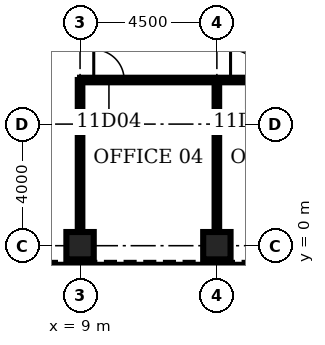
"""IFC4 building model, lengths in metres.
Left out: names, types, materials, properties, quantities, classifications, styles, units other than length and angle.
Written with IfcOpenShell. Run it as: python <this file> out.ifc"""

import sys

from ifc_helpers import new_model, si_unit, direction, frame, frame_2d, origin, origin_2d, place, context, subcontext, project, spatial, rectangle, hollow_rectangle, extrude, element, fill, save


model = new_model("IFC4")
c1 = context("Model", 3, precision=1e-05, world=origin(), true_north=direction((0.0, 1.0)))
c2 = subcontext(c1, "Body", "Model", "MODEL_VIEW")
j1 = project(units=[si_unit("LENGTHUNIT", "METRE"), si_unit("PLANEANGLEUNIT", "RADIAN")], contexts=[c1])
p1 = place(None, origin())
s1 = spatial("IfcSite", under=j1, at=p1, CompositionType="ELEMENT")
p2 = place(p1, origin())
s2 = spatial("IfcBuilding", under=s1, at=p2, CompositionType="ELEMENT")
p3 = place(p2, frame((0.0, 0.0, 54.5)))
s3 = spatial("IfcBuildingStorey", under=s2, at=p3, CompositionType="ELEMENT", Elevation=54.5)
for number, where, z_axis, x_axis in (
    (1, (9.0, 0.0, 0.0), (0.0, 0.0, 1.0), (0.0, 1.0, 0.0)),
    (2, (13.5, 0.0, 0.0), (0.0, 0.0, 1.0), (0.0, 1.0, 0.0)),
):
    element("IfcColumn", number, at=place(p3, frame(where, z_axis=z_axis, x_axis=x_axis)), inside=s3, PredefinedType="COLUMN", context=c2, shape_type="SweptSolid", body=[
        extrude(hollow_rectangle(XDim=0.9, YDim=0.9, WallThickness=0.12, at=origin_2d()), origin(), (0.0, 0.0, 1.0), 4.5),
    ])
p4 = place(p3, frame((9.0, 5.45, 0.0), z_axis=(0.0, 0.0, 1.0), x_axis=(1.0, 0.0, 0.0)))
e3 = element("IfcWall", 3, at=p4, inside=s3, PredefinedType="PARTITIONING", context=c2, shape_type="SweptSolid", body=[
    extrude(rectangle(XDim=13.5, YDim=0.15, at=frame_2d((6.75, 0.0))), origin(), (0.0, 0.0, 1.0), 3.0),
])
p5 = place(p4, frame((0.45, 0.0, 0.0)))
e4 = element("IfcOpeningElement", 4, at=p5, cuts=e3, PredefinedType="OPENING", context=c2, shape_type="SweptSolid", body=[
    extrude(rectangle(XDim=1.0, YDim=2.1, at=frame_2d((0.5, 1.05))), frame((0.0, 0.085, 0.0), z_axis=(0.0, -1.0, 0.0), x_axis=(1.0, 0.0, 0.0)), (0.0, 0.0, 1.0), 0.17),
])
p6 = place(p4, frame((4.95, 0.0, 0.0)))
e5 = element("IfcOpeningElement", 5, at=p6, cuts=e3, PredefinedType="OPENING", context=c2, shape_type="SweptSolid", body=[
    extrude(rectangle(XDim=1.0, YDim=2.1, at=frame_2d((0.5, 1.05))), frame((0.0, 0.085, 0.0), z_axis=(0.0, -1.0, 0.0), x_axis=(1.0, 0.0, 0.0)), (0.0, 0.0, 1.0), 0.17),
])
p7 = place(p4, frame((9.45, 0.0, 0.0)))
e6 = element("IfcOpeningElement", 6, at=p7, cuts=e3, PredefinedType="OPENING", context=c2, shape_type="SweptSolid", body=[
    extrude(rectangle(XDim=1.0, YDim=2.1, at=frame_2d((0.5, 1.05))), frame((0.0, 0.085, 0.0), z_axis=(0.0, -1.0, 0.0), x_axis=(1.0, 0.0, 0.0)), (0.0, 0.0, 1.0), 0.17),
])
for number, where, z_axis, x_axis in (
    (7, (9.0, 0.45, 0.0), (0.0, 0.0, 1.0), (0.0, 1.0, 0.0)),
    (8, (13.5, 0.45, 0.0), (0.0, 0.0, 1.0), (0.0, 1.0, 0.0)),
):
    element("IfcWall", number, at=place(p3, frame(where, z_axis=z_axis, x_axis=x_axis)), inside=s3, PredefinedType="PARTITIONING", context=c2, shape_type="SweptSolid", body=[
        extrude(rectangle(XDim=5.0, YDim=0.15, at=frame_2d((2.5, 0.0))), origin(), (0.0, 0.0, 1.0), 3.0),
    ])
p8 = place(p5, origin())
e9 = element("IfcDoor", 9, at=p8, inside=s3, OperationType="SINGLE_SWING_LEFT", PredefinedType="DOOR", context=c2, shape_type="SweptSolid", body=[
    extrude(rectangle(XDim=1.0, YDim=2.1, at=frame_2d((0.5, 1.05))), frame((0.0, 0.025, 0.0), z_axis=(0.0, -1.0, 0.0), x_axis=(1.0, 0.0, 0.0)), (0.0, 0.0, 1.0), 0.05),
])
fill(e4, e9)
p9 = place(p6, origin())
e10 = element("IfcDoor", 10, at=p9, inside=s3, OperationType="SINGLE_SWING_LEFT", PredefinedType="DOOR", context=c2, shape_type="SweptSolid", body=[
    extrude(rectangle(XDim=1.0, YDim=2.1, at=frame_2d((0.5, 1.05))), frame((0.0, 0.025, 0.0), z_axis=(0.0, -1.0, 0.0), x_axis=(1.0, 0.0, 0.0)), (0.0, 0.0, 1.0), 0.05),
])
fill(e5, e10)
save(model, sys.argv[1])
